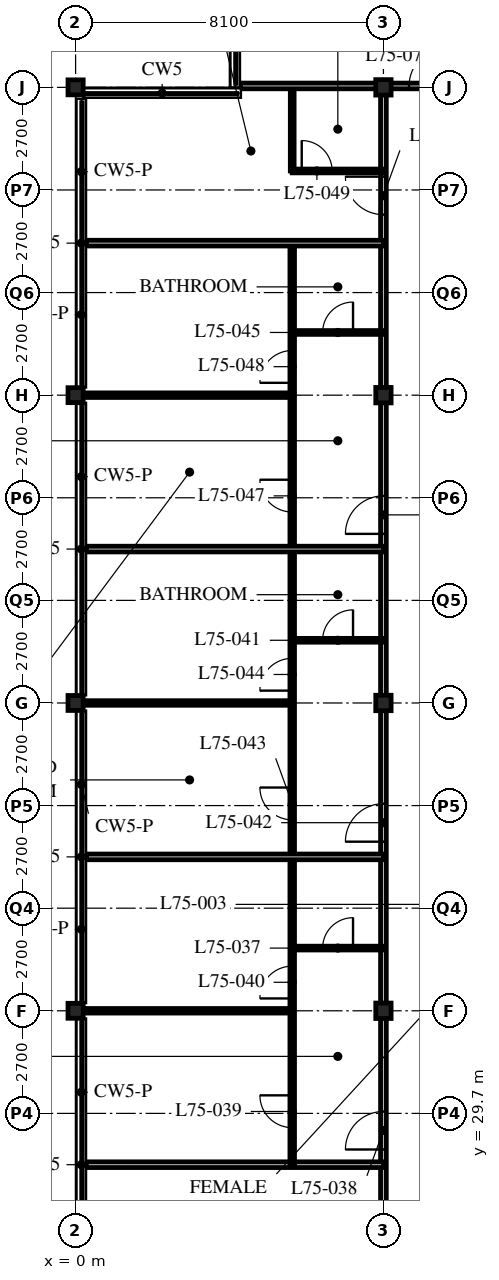
"""IFC4 building model, lengths in metres.
Left out: names, types, materials, properties, quantities, classifications, styles, units other than length and angle.
Written with IfcOpenShell. Run it as: python <this file> out.ifc"""

import sys

from ifc_helpers import new_model, si_unit, direction, frame, frame_2d, origin, origin_2d, place, context, subcontext, project, spatial, rectangle, i_section, extrude, element, fill, save


model = new_model("IFC4")
c1 = context("Model", 3, precision=1e-05, world=origin(), true_north=direction((0.0, 1.0)))
c2 = subcontext(c1, "Body", "Model", "MODEL_VIEW")
j1 = project(units=[si_unit("LENGTHUNIT", "METRE"), si_unit("PLANEANGLEUNIT", "RADIAN")], contexts=[c1])
p1 = place(None, origin())
s1 = spatial("IfcSite", under=j1, at=p1, CompositionType="ELEMENT")
p2 = place(p1, origin())
s2 = spatial("IfcBuilding", under=s1, at=p2, CompositionType="ELEMENT")
p3 = place(p2, frame((0.0, 0.0, 293.1)))
s3 = spatial("IfcBuildingStorey", under=s2, at=p3, CompositionType="ELEMENT", Elevation=293.1)
for number, where, z_axis, x_axis in (
    (1, (0.0, 32.4, 0.0), (0.0, 0.0, 1.0), (1.0, 0.0, 0.0)),
    (2, (0.0, 40.5, 0.0), (0.0, 0.0, 1.0), (1.0, 0.0, 0.0)),
    (3, (0.0, 48.6, 0.0), (0.0, 0.0, 1.0), (1.0, 0.0, 0.0)),
    (4, (0.0, 56.7, 0.0), (0.0, 0.0, 1.0), (1.0, 0.0, 0.0)),
):
    element("IfcColumn", number, at=place(p3, frame(where, z_axis=z_axis, x_axis=x_axis)), inside=s3, PredefinedType="COLUMN", context=c2, shape_type="SweptSolid", body=[
        extrude(i_section(OverallWidth=0.399, OverallDepth=0.394, WebThickness=0.023, FlangeThickness=0.037, FilletRadius=0.015, at=origin_2d()), origin(), (0.0, 0.0, 1.0), 5.4),
    ])
for number, where, z_axis, x_axis in (
    (5, (8.1, 32.4, 0.0), (0.0, 0.0, 1.0), (1.0, 0.0, 0.0)),
    (6, (8.1, 40.5, 0.0), (0.0, 0.0, 1.0), (1.0, 0.0, 0.0)),
    (7, (8.1, 48.6, 0.0), (0.0, 0.0, 1.0), (1.0, 0.0, 0.0)),
    (8, (8.1, 56.7, 0.0), (0.0, 0.0, 1.0), (1.0, 0.0, 0.0)),
):
    element("IfcColumn", number, at=place(p3, frame(where, z_axis=z_axis, x_axis=x_axis)), inside=s3, PredefinedType="COLUMN", context=c2, shape_type="SweptSolid", body=[
        extrude(i_section(OverallWidth=0.403, OverallDepth=0.406, WebThickness=0.027, FlangeThickness=0.043, FilletRadius=0.015, at=origin_2d()), origin(), (0.0, 0.0, 1.0), 5.4),
    ])
p4 = place(p3, frame((8.1, 56.738, 0.0), z_axis=(0.0, 0.0, 1.0), x_axis=(0.999999569095, -0.000928336791, 0.0)))
e9 = element("IfcWall", 9, at=p4, inside=s3, PredefinedType="PARTITIONING", context=c2, shape_type="SweptSolid", body=[
    extrude(rectangle(XDim=40.5, YDim=0.15, at=frame_2d((20.25, 0.0))), origin(), (0.0, 0.0, 1.0), 4.271),
])
p5 = place(p4, frame((4.45, 0.0, 0.0)))
e10 = element("IfcOpeningElement", 10, at=p5, cuts=e9, PredefinedType="OPENING", context=c2, shape_type="SweptSolid", body=[
    extrude(rectangle(XDim=1.0, YDim=2.1, at=frame_2d((0.5, 1.05))), frame((0.0, 0.085, 0.0), z_axis=(0.0, -1.0, 0.0), x_axis=(1.0, 0.0, 0.0)), (0.0, 0.0, 1.0), 0.17),
])
p6 = place(p4, frame((12.55, 0.0, 0.0)))
e11 = element("IfcOpeningElement", 11, at=p6, cuts=e9, PredefinedType="OPENING", context=c2, shape_type="SweptSolid", body=[
    extrude(rectangle(XDim=1.0, YDim=2.1, at=frame_2d((0.5, 1.05))), frame((0.0, 0.085, 0.0), z_axis=(0.0, -1.0, 0.0), x_axis=(1.0, 0.0, 0.0)), (0.0, 0.0, 1.0), 0.17),
])
p7 = place(p4, frame((20.65, 0.0, 0.0)))
e12 = element("IfcOpeningElement", 12, at=p7, cuts=e9, PredefinedType="OPENING", context=c2, shape_type="SweptSolid", body=[
    extrude(rectangle(XDim=1.0, YDim=2.1, at=frame_2d((0.5, 1.05))), frame((0.0, 0.085, 0.0), z_axis=(0.0, -1.0, 0.0), x_axis=(1.0, 0.0, 0.0)), (0.0, 0.0, 1.0), 0.17),
])
p8 = place(p4, frame((28.75, 0.0, 0.0)))
e13 = element("IfcOpeningElement", 13, at=p8, cuts=e9, PredefinedType="OPENING", context=c2, shape_type="SweptSolid", body=[
    extrude(rectangle(XDim=1.0, YDim=2.1, at=frame_2d((0.5, 1.05))), frame((0.0, 0.085, 0.0), z_axis=(0.0, -1.0, 0.0), x_axis=(1.0, 0.0, 0.0)), (0.0, 0.0, 1.0), 0.17),
])
p9 = place(p4, frame((38.825, 0.0, 0.0)))
e14 = element("IfcOpeningElement", 14, at=p9, cuts=e9, PredefinedType="OPENING", context=c2, shape_type="SweptSolid", body=[
    extrude(rectangle(XDim=1.0, YDim=2.1, at=frame_2d((0.5, 1.05))), frame((0.0, 0.085, 0.0), z_axis=(0.0, -1.0, 0.0), x_axis=(1.0, 0.0, 0.0)), (0.0, 0.0, 1.0), 0.17),
])
p10 = place(p4, frame((0.675, 0.0, 0.0)))
e15 = element("IfcOpeningElement", 15, at=p10, cuts=e9, PredefinedType="OPENING", context=c2, shape_type="SweptSolid", body=[
    extrude(rectangle(XDim=1.0, YDim=2.1, at=frame_2d((0.5, 1.05))), frame((0.0, 0.085, 0.0), z_axis=(0.0, -1.0, 0.0), x_axis=(1.0, 0.0, 0.0)), (0.0, 0.0, 1.0), 0.17),
])
p11 = place(p3, frame((8.1, 22.5, 0.0), z_axis=(0.0, 0.0, 1.0), x_axis=(0.0, 1.0, 0.0)))
e16 = element("IfcWall", 16, at=p11, inside=s3, PredefinedType="PARTITIONING", context=c2, shape_type="SweptSolid", body=[
    extrude(rectangle(XDim=34.238, YDim=0.15, at=frame_2d((17.119, 0.0))), origin(), (0.0, 0.0, 1.0), 4.271),
])
p12 = place(p11, frame((2.675, 0.0, 0.0)))
e17 = element("IfcOpeningElement", 17, at=p12, cuts=e16, PredefinedType="OPENING", context=c2, shape_type="SweptSolid", body=[
    extrude(rectangle(XDim=1.0, YDim=2.1, at=frame_2d((0.5, 1.05))), frame((0.0, 0.085, 0.0), z_axis=(0.0, -1.0, 0.0), x_axis=(1.0, 0.0, 0.0)), (0.0, 0.0, 1.0), 0.17),
])
p13 = place(p11, frame((6.25, 0.0, 0.0)))
e18 = element("IfcOpeningElement", 18, at=p13, cuts=e16, PredefinedType="OPENING", context=c2, shape_type="SweptSolid", body=[
    extrude(rectangle(XDim=1.0, YDim=2.1, at=frame_2d((0.5, 1.05))), frame((0.0, 0.085, 0.0), z_axis=(0.0, -1.0, 0.0), x_axis=(1.0, 0.0, 0.0)), (0.0, 0.0, 1.0), 0.17),
])
p14 = place(p11, frame((14.35, 0.0, 0.0)))
e19 = element("IfcOpeningElement", 19, at=p14, cuts=e16, PredefinedType="OPENING", context=c2, shape_type="SweptSolid", body=[
    extrude(rectangle(XDim=1.0, YDim=2.1, at=frame_2d((0.5, 1.05))), frame((0.0, 0.085, 0.0), z_axis=(0.0, -1.0, 0.0), x_axis=(1.0, 0.0, 0.0)), (0.0, 0.0, 1.0), 0.17),
])
p15 = place(p11, frame((22.45, 0.0, 0.0)))
e20 = element("IfcOpeningElement", 20, at=p15, cuts=e16, PredefinedType="OPENING", context=c2, shape_type="SweptSolid", body=[
    extrude(rectangle(XDim=1.0, YDim=2.1, at=frame_2d((0.5, 1.05))), frame((0.0, 0.085, 0.0), z_axis=(0.0, -1.0, 0.0), x_axis=(1.0, 0.0, 0.0)), (0.0, 0.0, 1.0), 0.17),
])
p16 = place(p11, frame((30.85, 0.0, 0.0)))
e21 = element("IfcOpeningElement", 21, at=p16, cuts=e16, PredefinedType="OPENING", context=c2, shape_type="SweptSolid", body=[
    extrude(rectangle(XDim=1.0, YDim=2.1, at=frame_2d((0.5, 1.05))), frame((0.0, 0.085, 0.0), z_axis=(0.0, -1.0, 0.0), x_axis=(1.0, 0.0, 0.0)), (0.0, 0.0, 1.0), 0.17),
])
p17 = place(p3, frame((8.1, 28.35, 0.0), z_axis=(0.0, 0.0, 1.0), x_axis=(-1.0, 0.0, 0.0)))
e22 = element("IfcWall", 22, at=p17, inside=s3, PredefinedType="PARTITIONING", context=c2, shape_type="SweptSolid", body=[
    extrude(rectangle(XDim=7.822, YDim=0.15, at=frame_2d((3.911, 0.0))), origin(), (0.0, 0.0, 1.0), 5.19),
])
p18 = place(p3, frame((5.7, 28.35, 0.0), z_axis=(0.0, 0.0, 1.0), x_axis=(0.0, 1.0, 0.0)))
e23 = element("IfcWall", 23, at=p18, inside=s3, PredefinedType="PARTITIONING", context=c2, shape_type="SweptSolid", body=[
    extrude(rectangle(XDim=24.251, YDim=0.12, at=frame_2d((12.125, 0.0))), origin(), (0.0, 0.0, 1.0), 5.19),
])
p19 = place(p18, frame((0.975, 0.0, 0.0)))
e24 = element("IfcOpeningElement", 24, at=p19, cuts=e23, PredefinedType="OPENING", context=c2, shape_type="SweptSolid", body=[
    extrude(rectangle(XDim=0.85, YDim=2.1, at=frame_2d((0.425, 1.05))), frame((0.0, 0.07, 0.0), z_axis=(0.0, -1.0, 0.0), x_axis=(1.0, 0.0, 0.0)), (0.0, 0.0, 1.0), 0.14),
])
p20 = place(p18, frame((4.375, 0.0, 0.0)))
e25 = element("IfcOpeningElement", 25, at=p20, cuts=e23, PredefinedType="OPENING", context=c2, shape_type="SweptSolid", body=[
    extrude(rectangle(XDim=0.85, YDim=2.1, at=frame_2d((0.425, 1.05))), frame((0.0, 0.07, 0.0), z_axis=(0.0, -1.0, 0.0), x_axis=(1.0, 0.0, 0.0)), (0.0, 0.0, 1.0), 0.14),
])
p21 = place(p18, frame((9.075, 0.0, 0.0)))
e26 = element("IfcOpeningElement", 26, at=p21, cuts=e23, PredefinedType="OPENING", context=c2, shape_type="SweptSolid", body=[
    extrude(rectangle(XDim=0.85, YDim=2.1, at=frame_2d((0.425, 1.05))), frame((0.0, 0.07, 0.0), z_axis=(0.0, -1.0, 0.0), x_axis=(1.0, 0.0, 0.0)), (0.0, 0.0, 1.0), 0.14),
])
p22 = place(p18, frame((12.475, 0.0, 0.0)))
e27 = element("IfcOpeningElement", 27, at=p22, cuts=e23, PredefinedType="OPENING", context=c2, shape_type="SweptSolid", body=[
    extrude(rectangle(XDim=0.85, YDim=2.1, at=frame_2d((0.425, 1.05))), frame((0.0, 0.07, 0.0), z_axis=(0.0, -1.0, 0.0), x_axis=(1.0, 0.0, 0.0)), (0.0, 0.0, 1.0), 0.14),
])
p23 = place(p18, frame((17.175, 0.0, 0.0)))
e28 = element("IfcOpeningElement", 28, at=p23, cuts=e23, PredefinedType="OPENING", context=c2, shape_type="SweptSolid", body=[
    extrude(rectangle(XDim=0.85, YDim=2.1, at=frame_2d((0.425, 1.05))), frame((0.0, 0.07, 0.0), z_axis=(0.0, -1.0, 0.0), x_axis=(1.0, 0.0, 0.0)), (0.0, 0.0, 1.0), 0.14),
])
p24 = place(p18, frame((20.575, 0.0, 0.0)))
e29 = element("IfcOpeningElement", 29, at=p24, cuts=e23, PredefinedType="OPENING", context=c2, shape_type="SweptSolid", body=[
    extrude(rectangle(XDim=0.85, YDim=2.1, at=frame_2d((0.425, 1.05))), frame((0.0, 0.07, 0.0), z_axis=(0.0, -1.0, 0.0), x_axis=(1.0, 0.0, 0.0)), (0.0, 0.0, 1.0), 0.14),
])
p25 = place(p3, frame((8.1, 34.05, 0.0), z_axis=(0.0, 0.0, 1.0), x_axis=(-1.0, 0.0, 0.0)))
e30 = element("IfcWall", 30, at=p25, inside=s3, PredefinedType="PARTITIONING", context=c2, shape_type="SweptSolid", body=[
    extrude(rectangle(XDim=2.4, YDim=0.1, at=frame_2d((1.2, 0.0))), origin(), (0.0, 0.0, 1.0), 5.19),
])
p26 = place(p25, frame((0.8, 0.0, 0.0)))
e31 = element("IfcOpeningElement", 31, at=p26, cuts=e30, PredefinedType="OPENING", context=c2, shape_type="SweptSolid", body=[
    extrude(rectangle(XDim=0.8, YDim=2.1, at=frame_2d((0.4, 1.05))), frame((0.0, 0.06, 0.0), z_axis=(0.0, -1.0, 0.0), x_axis=(1.0, 0.0, 0.0)), (0.0, 0.0, 1.0), 0.12),
])
p27 = place(p3, frame((5.7, 32.4, 0.0), z_axis=(0.0, 0.0, 1.0), x_axis=(-1.0, 0.0, 0.0)))
e32 = element("IfcWall", 32, at=p27, inside=s3, PredefinedType="PARTITIONING", context=c2, shape_type="SweptSolid", body=[
    extrude(rectangle(XDim=5.4, YDim=0.12, at=frame_2d((2.7, 0.0))), origin(), (0.0, 0.0, 1.0), 4.271),
])
p28 = place(p3, frame((8.1, 36.45, 0.0), z_axis=(0.0, 0.0, 1.0), x_axis=(-1.0, 0.0, 0.0)))
e33 = element("IfcWall", 33, at=p28, inside=s3, PredefinedType="PARTITIONING", context=c2, shape_type="SweptSolid", body=[
    extrude(rectangle(XDim=7.822, YDim=0.15, at=frame_2d((3.911, 0.0))), origin(), (0.0, 0.0, 1.0), 5.19),
])
p29 = place(p3, frame((8.1, 42.15, 0.0), z_axis=(0.0, 0.0, 1.0), x_axis=(-1.0, 0.0, 0.0)))
e34 = element("IfcWall", 34, at=p29, inside=s3, PredefinedType="PARTITIONING", context=c2, shape_type="SweptSolid", body=[
    extrude(rectangle(XDim=2.4, YDim=0.1, at=frame_2d((1.2, 0.0))), origin(), (0.0, 0.0, 1.0), 5.19),
])
p30 = place(p29, frame((0.8, 0.0, 0.0)))
e35 = element("IfcOpeningElement", 35, at=p30, cuts=e34, PredefinedType="OPENING", context=c2, shape_type="SweptSolid", body=[
    extrude(rectangle(XDim=0.8, YDim=2.1, at=frame_2d((0.4, 1.05))), frame((0.0, 0.06, 0.0), z_axis=(0.0, -1.0, 0.0), x_axis=(1.0, 0.0, 0.0)), (0.0, 0.0, 1.0), 0.12),
])
p31 = place(p3, frame((5.7, 40.5, 0.0), z_axis=(0.0, 0.0, 1.0), x_axis=(-1.0, 0.0, 0.0)))
e36 = element("IfcWall", 36, at=p31, inside=s3, PredefinedType="PARTITIONING", context=c2, shape_type="SweptSolid", body=[
    extrude(rectangle(XDim=5.4, YDim=0.12, at=frame_2d((2.7, 0.0))), origin(), (0.0, 0.0, 1.0), 4.271),
])
p32 = place(p3, frame((8.1, 44.55, 0.0), z_axis=(0.0, 0.0, 1.0), x_axis=(-1.0, 0.0, 0.0)))
e37 = element("IfcWall", 37, at=p32, inside=s3, PredefinedType="PARTITIONING", context=c2, shape_type="SweptSolid", body=[
    extrude(rectangle(XDim=7.822, YDim=0.15, at=frame_2d((3.911, 0.0))), origin(), (0.0, 0.0, 1.0), 5.19),
])
p33 = place(p3, frame((8.1, 50.25, 0.0), z_axis=(0.0, 0.0, 1.0), x_axis=(-1.0, 0.0, 0.0)))
e38 = element("IfcWall", 38, at=p33, inside=s3, PredefinedType="PARTITIONING", context=c2, shape_type="SweptSolid", body=[
    extrude(rectangle(XDim=2.4, YDim=0.1, at=frame_2d((1.2, 0.0))), origin(), (0.0, 0.0, 1.0), 5.19),
])
p34 = place(p33, frame((0.8, 0.0, 0.0)))
e39 = element("IfcOpeningElement", 39, at=p34, cuts=e38, PredefinedType="OPENING", context=c2, shape_type="SweptSolid", body=[
    extrude(rectangle(XDim=0.8, YDim=2.1, at=frame_2d((0.4, 1.05))), frame((0.0, 0.06, 0.0), z_axis=(0.0, -1.0, 0.0), x_axis=(1.0, 0.0, 0.0)), (0.0, 0.0, 1.0), 0.12),
])
p35 = place(p3, frame((5.7, 48.6, 0.0), z_axis=(0.0, 0.0, 1.0), x_axis=(-1.0, 0.0, 0.0)))
e40 = element("IfcWall", 40, at=p35, inside=s3, PredefinedType="PARTITIONING", context=c2, shape_type="SweptSolid", body=[
    extrude(rectangle(XDim=5.4, YDim=0.12, at=frame_2d((2.7, 0.0))), origin(), (0.0, 0.0, 1.0), 4.271),
])
p36 = place(p3, frame((8.1, 52.601, 0.0), z_axis=(0.0, 0.0, 1.0), x_axis=(-1.0, 0.0, 0.0)))
e41 = element("IfcWall", 41, at=p36, inside=s3, PredefinedType="PARTITIONING", context=c2, shape_type="SweptSolid", body=[
    extrude(rectangle(XDim=7.822, YDim=0.15, at=frame_2d((3.911, 0.0))), origin(), (0.0, 0.0, 1.0), 5.19),
])
p37 = place(p3, frame((5.7, 54.5, 0.0), z_axis=(0.0, 0.0, 1.0), x_axis=(0.0, 1.0, 0.0)))
e42 = element("IfcWall", 42, at=p37, inside=s3, PredefinedType="PARTITIONING", context=c2, shape_type="SweptSolid", body=[
    extrude(rectangle(XDim=2.238, YDim=0.1, at=frame_2d((1.119, 0.0))), origin(), (0.0, 0.0, 1.0), 5.19),
])
p38 = place(p3, frame((8.1, 54.5, 0.0), z_axis=(0.0, 0.0, 1.0), x_axis=(-1.0, 0.0, 0.0)))
e43 = element("IfcWall", 43, at=p38, inside=s3, PredefinedType="PARTITIONING", context=c2, shape_type="SweptSolid", body=[
    extrude(rectangle(XDim=2.4, YDim=0.1, at=frame_2d((1.2, 0.0))), origin(), (0.0, 0.0, 1.0), 5.19),
])
p39 = place(p38, frame((1.35, 0.0, 0.0)))
e44 = element("IfcOpeningElement", 44, at=p39, cuts=e43, PredefinedType="OPENING", context=c2, shape_type="SweptSolid", body=[
    extrude(rectangle(XDim=0.8, YDim=2.1, at=frame_2d((0.4, 1.05))), frame((0.0, 0.06, 0.0), z_axis=(0.0, -1.0, 0.0), x_axis=(1.0, 0.0, 0.0)), (0.0, 0.0, 1.0), 0.12),
])
p40 = place(p3, frame((4.328, 56.738, 0.0), z_axis=(0.0, 0.0, 1.0), x_axis=(1.0, 0.0, 0.0)))
e45 = element("IfcWall", 45, at=p40, inside=s3, PredefinedType="PARTITIONING", context=c2, shape_type="SweptSolid", body=[
    extrude(rectangle(XDim=3.772, YDim=0.15, at=frame_2d((1.886, 0.0))), origin(), (0.0, 0.0, 1.0), 4.271),
])
p41 = place(p26, origin())
e46 = element("IfcDoor", 46, at=p41, inside=s3, OperationType="SINGLE_SWING_RIGHT", PredefinedType="DOOR", context=c2, shape_type="SweptSolid", body=[
    extrude(rectangle(XDim=0.8, YDim=2.1, at=frame_2d((0.4, 1.05))), frame((0.0, 0.025, 0.0), z_axis=(0.0, -1.0, 0.0), x_axis=(1.0, 0.0, 0.0)), (0.0, 0.0, 1.0), 0.05),
])
fill(e31, e46)
p42 = place(p13, origin())
e47 = element("IfcDoor", 47, at=p42, inside=s3, OperationType="SINGLE_SWING_LEFT", PredefinedType="DOOR", context=c2, shape_type="SweptSolid", body=[
    extrude(rectangle(XDim=1.0, YDim=2.1, at=frame_2d((0.5, 1.05))), frame((0.0, 0.025, 0.0), z_axis=(0.0, -1.0, 0.0), x_axis=(1.0, 0.0, 0.0)), (0.0, 0.0, 1.0), 0.05),
])
fill(e18, e47)
p43 = place(p19, origin())
e48 = element("IfcDoor", 48, at=p43, inside=s3, OperationType="SINGLE_SWING_RIGHT", PredefinedType="DOOR", context=c2, shape_type="SweptSolid", body=[
    extrude(rectangle(XDim=0.85, YDim=2.1, at=frame_2d((0.425, 1.05))), frame((0.0, 0.025, 0.0), z_axis=(0.0, -1.0, 0.0), x_axis=(1.0, 0.0, 0.0)), (0.0, 0.0, 1.0), 0.05),
])
fill(e24, e48)
p44 = place(p20, origin())
e49 = element("IfcDoor", 49, at=p44, inside=s3, OperationType="SINGLE_SWING_LEFT", PredefinedType="DOOR", context=c2, shape_type="SweptSolid", body=[
    extrude(rectangle(XDim=0.85, YDim=2.1, at=frame_2d((0.425, 1.05))), frame((0.0, 0.025, 0.0), z_axis=(0.0, -1.0, 0.0), x_axis=(1.0, 0.0, 0.0)), (0.0, 0.0, 1.0), 0.05),
])
fill(e25, e49)
p45 = place(p30, origin())
e50 = element("IfcDoor", 50, at=p45, inside=s3, OperationType="SINGLE_SWING_RIGHT", PredefinedType="DOOR", context=c2, shape_type="SweptSolid", body=[
    extrude(rectangle(XDim=0.8, YDim=2.1, at=frame_2d((0.4, 1.05))), frame((0.0, 0.025, 0.0), z_axis=(0.0, -1.0, 0.0), x_axis=(1.0, 0.0, 0.0)), (0.0, 0.0, 1.0), 0.05),
])
fill(e35, e50)
p46 = place(p14, origin())
e51 = element("IfcDoor", 51, at=p46, inside=s3, OperationType="SINGLE_SWING_LEFT", PredefinedType="DOOR", context=c2, shape_type="SweptSolid", body=[
    extrude(rectangle(XDim=1.0, YDim=2.1, at=frame_2d((0.5, 1.05))), frame((0.0, 0.025, 0.0), z_axis=(0.0, -1.0, 0.0), x_axis=(1.0, 0.0, 0.0)), (0.0, 0.0, 1.0), 0.05),
])
fill(e19, e51)
p47 = place(p21, origin())
e52 = element("IfcDoor", 52, at=p47, inside=s3, OperationType="SINGLE_SWING_RIGHT", PredefinedType="DOOR", context=c2, shape_type="SweptSolid", body=[
    extrude(rectangle(XDim=0.85, YDim=2.1, at=frame_2d((0.425, 1.05))), frame((0.0, 0.025, 0.0), z_axis=(0.0, -1.0, 0.0), x_axis=(1.0, 0.0, 0.0)), (0.0, 0.0, 1.0), 0.05),
])
fill(e26, e52)
p48 = place(p22, origin())
e53 = element("IfcDoor", 53, at=p48, inside=s3, OperationType="SINGLE_SWING_LEFT", PredefinedType="DOOR", context=c2, shape_type="SweptSolid", body=[
    extrude(rectangle(XDim=0.85, YDim=2.1, at=frame_2d((0.425, 1.05))), frame((0.0, 0.025, 0.0), z_axis=(0.0, -1.0, 0.0), x_axis=(1.0, 0.0, 0.0)), (0.0, 0.0, 1.0), 0.05),
])
fill(e27, e53)
p49 = place(p34, origin())
e54 = element("IfcDoor", 54, at=p49, inside=s3, OperationType="SINGLE_SWING_RIGHT", PredefinedType="DOOR", context=c2, shape_type="SweptSolid", body=[
    extrude(rectangle(XDim=0.8, YDim=2.1, at=frame_2d((0.4, 1.05))), frame((0.0, 0.025, 0.0), z_axis=(0.0, -1.0, 0.0), x_axis=(1.0, 0.0, 0.0)), (0.0, 0.0, 1.0), 0.05),
])
fill(e39, e54)
p50 = place(p15, origin())
e55 = element("IfcDoor", 55, at=p50, inside=s3, OperationType="SINGLE_SWING_LEFT", PredefinedType="DOOR", context=c2, shape_type="SweptSolid", body=[
    extrude(rectangle(XDim=1.0, YDim=2.1, at=frame_2d((0.5, 1.05))), frame((0.0, 0.025, 0.0), z_axis=(0.0, -1.0, 0.0), x_axis=(1.0, 0.0, 0.0)), (0.0, 0.0, 1.0), 0.05),
])
fill(e20, e55)
p51 = place(p23, origin())
e56 = element("IfcDoor", 56, at=p51, inside=s3, OperationType="SINGLE_SWING_RIGHT", PredefinedType="DOOR", context=c2, shape_type="SweptSolid", body=[
    extrude(rectangle(XDim=0.85, YDim=2.1, at=frame_2d((0.425, 1.05))), frame((0.0, 0.025, 0.0), z_axis=(0.0, -1.0, 0.0), x_axis=(1.0, 0.0, 0.0)), (0.0, 0.0, 1.0), 0.05),
])
fill(e28, e56)
p52 = place(p24, origin())
e57 = element("IfcDoor", 57, at=p52, inside=s3, OperationType="SINGLE_SWING_LEFT", PredefinedType="DOOR", context=c2, shape_type="SweptSolid", body=[
    extrude(rectangle(XDim=0.85, YDim=2.1, at=frame_2d((0.425, 1.05))), frame((0.0, 0.025, 0.0), z_axis=(0.0, -1.0, 0.0), x_axis=(1.0, 0.0, 0.0)), (0.0, 0.0, 1.0), 0.05),
])
fill(e29, e57)
p53 = place(p39, origin())
e58 = element("IfcDoor", 58, at=p53, inside=s3, OperationType="SINGLE_SWING_LEFT", PredefinedType="DOOR", context=c2, shape_type="SweptSolid", body=[
    extrude(rectangle(XDim=0.8, YDim=2.1, at=frame_2d((0.4, 1.05))), frame((0.0, 0.025, 0.0), z_axis=(0.0, -1.0, 0.0), x_axis=(1.0, 0.0, 0.0)), (0.0, 0.0, 1.0), 0.05),
])
fill(e44, e58)
p54 = place(p16, origin())
e59 = element("IfcDoor", 59, at=p54, inside=s3, OperationType="SINGLE_SWING_RIGHT", PredefinedType="DOOR", context=c2, shape_type="SweptSolid", body=[
    extrude(rectangle(XDim=1.0, YDim=2.1, at=frame_2d((0.5, 1.05))), frame((0.0, 0.025, 0.0), z_axis=(0.0, -1.0, 0.0), x_axis=(1.0, 0.0, 0.0)), (0.0, 0.0, 1.0), 0.05),
])
fill(e21, e59)
p55 = place(p10, origin())
e60 = element("IfcDoor", 60, at=p55, inside=s3, OperationType="SINGLE_SWING_RIGHT", PredefinedType="DOOR", context=c2, shape_type="SweptSolid", body=[
    extrude(rectangle(XDim=1.0, YDim=2.1, at=frame_2d((0.5, 1.05))), frame((0.0, 0.025, 0.0), z_axis=(0.0, -1.0, 0.0), x_axis=(1.0, 0.0, 0.0)), (0.0, 0.0, 1.0), 0.05),
])
fill(e15, e60)
save(model, sys.argv[1])
